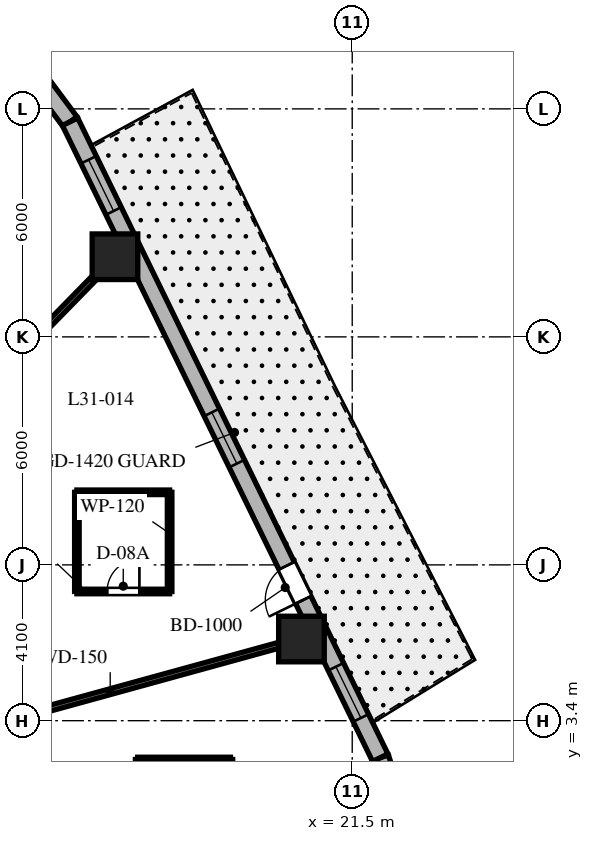
"""IFC4 building model, lengths in metres.
Left out: names, types, materials, properties, quantities, classifications, styles, units other than length and angle.
Written with IfcOpenShell. Run it as: python <this file> out.ifc"""

import sys

from ifc_helpers import new_model, si_unit, direction, frame, frame_2d, origin, origin_2d, place, context, subcontext, project, spatial, rectangle, extrude, element, fill, save


model = new_model("IFC4")
c1 = context("Model", 3, precision=1e-05, world=origin(), true_north=direction((0.0, 1.0)))
c2 = subcontext(c1, "Body", "Model", "MODEL_VIEW")
j1 = project(units=[si_unit("LENGTHUNIT", "METRE"), si_unit("PLANEANGLEUNIT", "RADIAN")], contexts=[c1])
p1 = place(None, origin())
s1 = spatial("IfcSite", under=j1, at=p1, CompositionType="ELEMENT")
p2 = place(p1, origin())
s2 = spatial("IfcBuilding", under=s1, at=p2, CompositionType="ELEMENT")
p3 = place(p2, frame((0.0, 0.0, 128.4)))
s3 = spatial("IfcBuildingStorey", under=s2, at=p3, CompositionType="ELEMENT", Elevation=128.4)
for number, where, z_axis, x_axis in (
    (1, (20.164, 5.549, 0.0), (0.0, 0.0, 1.0), (1.0, 0.0, 0.0)),
    (2, (15.257, 15.609, 0.0), (0.0, 0.0, 1.0), (1.0, 0.0, 0.0)),
):
    element("IfcColumn", number, at=place(p3, frame(where, z_axis=z_axis, x_axis=x_axis)), inside=s3, PredefinedType="COLUMN", context=c2, shape_type="SweptSolid", body=[
        extrude(rectangle(XDim=1.2, YDim=1.2, at=origin_2d()), origin(), (0.0, 0.0, 1.0), 3.7),
    ])
p4 = place(p3, frame((22.522, 1.577, 0.0), z_axis=(0.0, 0.0, 1.0), x_axis=(-0.317372694837, 0.948300887151, 0.0)))
e3 = element("IfcWall", 3, at=p4, inside=s3, PredefinedType="SOLIDWALL", context=c2, shape_type="SweptSolid", body=[
    extrude(rectangle(XDim=0.896, YDim=0.45, at=frame_2d((0.448, 0.0))), origin(), (0.0, 0.0, 1.0), 3.4),
])
p5 = place(p3, frame((14.076, 19.161, 0.0), z_axis=(0.0, 0.0, 1.0), x_axis=(-0.597226657159, 0.802072515412, 0.0)))
e4 = element("IfcWall", 4, at=p5, inside=s3, PredefinedType="SOLIDWALL", context=c2, shape_type="SweptSolid", body=[
    extrude(rectangle(XDim=1.269, YDim=0.45, at=frame_2d((0.635, 0.0))), origin(), (0.0, 0.0, 1.0), 3.4),
])
p6 = place(p3, frame((22.238, 2.427, 0.0), z_axis=(0.0, 0.0, 1.0), x_axis=(-0.438374803278, 0.898792262901, 0.0)))
e5 = element("IfcWall", 5, at=p6, inside=s3, PredefinedType="SOLIDWALL", context=c2, shape_type="SweptSolid", body=[
    extrude(rectangle(XDim=18.618, YDim=0.45, at=frame_2d((9.309, 0.0))), origin(), (0.0, 0.0, 1.0), 3.4),
])
p7 = place(p6, frame((4.62, 0.0, 0.0)))
e6 = element("IfcOpeningElement", 6, at=p7, cuts=e5, PredefinedType="OPENING", context=c2, shape_type="SweptSolid", body=[
    extrude(rectangle(XDim=1.0, YDim=2.15, at=frame_2d((0.5, 1.075))), frame((0.0, 0.235, 0.0), z_axis=(0.0, -1.0, 0.0), x_axis=(1.0, 0.0, 0.0)), (0.0, 0.0, 1.0), 0.47),
])
p8 = place(p6, frame((8.61, 0.0, 0.8)))
e7 = element("IfcOpeningElement", 7, at=p8, cuts=e5, PredefinedType="OPENING", context=c2, shape_type="SweptSolid", body=[
    extrude(rectangle(XDim=1.5, YDim=1.8, at=frame_2d((0.75, 0.9))), frame((0.0, 0.235, 0.0), z_axis=(0.0, -1.0, 0.0), x_axis=(1.0, 0.0, 0.0)), (0.0, 0.0, 1.0), 0.47),
])
p9 = place(p6, frame((16.006, 0.0, 0.8)))
e8 = element("IfcOpeningElement", 8, at=p9, cuts=e5, PredefinedType="OPENING", context=c2, shape_type="SweptSolid", body=[
    extrude(rectangle(XDim=1.5, YDim=1.8, at=frame_2d((0.75, 0.9))), frame((0.0, 0.235, 0.0), z_axis=(0.0, -1.0, 0.0), x_axis=(1.0, 0.0, 0.0)), (0.0, 0.0, 1.0), 0.47),
])
p10 = place(p6, frame((1.163, 0.0, 0.8)))
e9 = element("IfcOpeningElement", 9, at=p10, cuts=e5, PredefinedType="OPENING", context=c2, shape_type="SweptSolid", body=[
    extrude(rectangle(XDim=1.5, YDim=1.8, at=frame_2d((0.75, 0.9))), frame((0.0, 0.235, 0.0), z_axis=(0.0, -1.0, 0.0), x_axis=(1.0, 0.0, 0.0)), (0.0, 0.0, 1.0), 0.47),
])
p11 = place(p3, frame((11.35, 3.123, 0.0), z_axis=(0.0, 0.0, 1.0), x_axis=(0.964151983214, 0.265350623261, 0.0)))
e10 = element("IfcWall", 10, at=p11, inside=s3, PredefinedType="PARTITIONING", context=c2, shape_type="SweptSolid", body=[
    extrude(rectangle(XDim=9.645, YDim=0.15, at=frame_2d((4.823, 0.0))), origin(), (0.0, 0.0, 1.0), 2.54),
])
p12 = place(p3, frame((9.628, 9.85, 0.0), z_axis=(0.0, 0.0, 1.0), x_axis=(0.698992824326, 0.715128681805, 0.0)))
e11 = element("IfcWall", 11, at=p12, inside=s3, PredefinedType="PARTITIONING", context=c2, shape_type="SweptSolid", body=[
    extrude(rectangle(XDim=8.579, YDim=0.15, at=frame_2d((4.29, 0.0))), origin(), (0.0, 0.0, 1.0), 2.54),
])
p13 = place(p3, frame((14.255, 6.8, 0.0), z_axis=(0.0, 0.0, 1.0), x_axis=(1.0, 0.0, 0.0)))
e12 = element("IfcWall", 12, at=p13, inside=s3, PredefinedType="PARTITIONING", context=c2, shape_type="SweptSolid", body=[
    extrude(rectangle(XDim=2.44, YDim=0.12, at=frame_2d((1.22, 0.0))), origin(), (0.0, 0.0, 1.0), 2.927),
])
p14 = place(p13, frame((0.795, 0.0, 0.0)))
e13 = element("IfcOpeningElement", 13, at=p14, cuts=e12, PredefinedType="OPENING", context=c2, shape_type="SweptSolid", body=[
    extrude(rectangle(XDim=0.85, YDim=2.03, at=frame_2d((0.425, 1.015))), frame((0.0, 0.07, 0.0), z_axis=(0.0, -1.0, 0.0), x_axis=(1.0, 0.0, 0.0)), (0.0, 0.0, 1.0), 0.14),
])
p15 = place(p3, frame((16.695, 6.8, 0.0), z_axis=(0.0, 0.0, 1.0), x_axis=(0.0, 1.0, 0.0)))
e14 = element("IfcWall", 14, at=p15, inside=s3, PredefinedType="PARTITIONING", context=c2, shape_type="SweptSolid", body=[
    extrude(rectangle(XDim=2.61, YDim=0.12, at=frame_2d((1.305, 0.0))), origin(), (0.0, 0.0, 1.0), 3.4),
])
p16 = place(p3, frame((16.695, 9.41, 0.0), z_axis=(0.0, 0.0, 1.0), x_axis=(-1.0, 0.0, 0.0)))
e15 = element("IfcWall", 15, at=p16, inside=s3, PredefinedType="PARTITIONING", context=c2, shape_type="SweptSolid", body=[
    extrude(rectangle(XDim=2.44, YDim=0.12, at=frame_2d((1.22, 0.0))), origin(), (0.0, 0.0, 1.0), 2.927),
])
for number, where, z_axis, x_axis in (
    (16, (14.255, 9.41, 0.0), (0.0, 0.0, 1.0), (0.0, -1.0, 0.0)),
    (17, (18.295, -0.231, 0.0), (0.0, 0.0, 1.0), (0.0, 1.0, 0.0)),
):
    element("IfcWall", number, at=place(p3, frame(where, z_axis=z_axis, x_axis=x_axis)), inside=s3, PredefinedType="PARTITIONING", context=c2, shape_type="SweptSolid", body=[
        extrude(rectangle(XDim=2.61, YDim=0.12, at=frame_2d((1.305, 0.0))), origin(), (0.0, 0.0, 1.0), 3.4),
    ])
p17 = place(p3, frame((18.295, 2.379, 0.0), z_axis=(0.0, 0.0, 1.0), x_axis=(-1.0, 0.0, 0.0)))
e18 = element("IfcWall", 18, at=p17, inside=s3, PredefinedType="PARTITIONING", context=c2, shape_type="SweptSolid", body=[
    extrude(rectangle(XDim=2.44, YDim=0.12, at=frame_2d((1.22, 0.0))), origin(), (0.0, 0.0, 1.0), 2.841),
])
p18 = place(p3, frame((15.855, 2.379, 0.0), z_axis=(0.0, 0.0, 1.0), x_axis=(0.0, -1.0, 0.0)))
e19 = element("IfcWall", 19, at=p18, inside=s3, PredefinedType="PARTITIONING", context=c2, shape_type="SweptSolid", body=[
    extrude(rectangle(XDim=2.61, YDim=0.12, at=frame_2d((1.305, 0.0))), origin(), (0.0, 0.0, 1.0), 3.4),
])
p19 = place(p7, origin())
e20 = element("IfcDoor", 20, at=p19, inside=s3, OperationType="SINGLE_SWING_LEFT", PredefinedType="DOOR", context=c2, shape_type="SweptSolid", body=[
    extrude(rectangle(XDim=1.0, YDim=2.15, at=frame_2d((0.5, 1.075))), frame((0.0, 0.025, 0.0), z_axis=(0.0, -1.0, 0.0), x_axis=(1.0, 0.0, 0.0)), (0.0, 0.0, 1.0), 0.05),
])
fill(e6, e20)
p20 = place(p8, origin())
e21 = element("IfcWindow", 21, at=p20, inside=s3, PartitioningType="SINGLE_PANEL", PredefinedType="WINDOW", context=c2, shape_type="SweptSolid", body=[
    extrude(rectangle(XDim=1.5, YDim=1.8, at=frame_2d((0.75, 0.9))), frame((0.0, 0.03, 0.0), z_axis=(0.0, -1.0, 0.0), x_axis=(1.0, 0.0, 0.0)), (0.0, 0.0, 1.0), 0.06),
])
fill(e7, e21)
p21 = place(p9, origin())
e22 = element("IfcWindow", 22, at=p21, inside=s3, PartitioningType="SINGLE_PANEL", PredefinedType="WINDOW", context=c2, shape_type="SweptSolid", body=[
    extrude(rectangle(XDim=1.5, YDim=1.8, at=frame_2d((0.75, 0.9))), frame((0.0, 0.03, 0.0), z_axis=(0.0, -1.0, 0.0), x_axis=(1.0, 0.0, 0.0)), (0.0, 0.0, 1.0), 0.06),
])
fill(e8, e22)
p22 = place(p10, origin())
e23 = element("IfcWindow", 23, at=p22, inside=s3, PartitioningType="SINGLE_PANEL", PredefinedType="WINDOW", context=c2, shape_type="SweptSolid", body=[
    extrude(rectangle(XDim=1.5, YDim=1.8, at=frame_2d((0.75, 0.9))), frame((0.0, 0.03, 0.0), z_axis=(0.0, -1.0, 0.0), x_axis=(1.0, 0.0, 0.0)), (0.0, 0.0, 1.0), 0.06),
])
fill(e9, e23)
p23 = place(p14, origin())
e24 = element("IfcDoor", 24, at=p23, inside=s3, OperationType="SINGLE_SWING_RIGHT", PredefinedType="DOOR", context=c2, shape_type="SweptSolid", body=[
    extrude(rectangle(XDim=0.85, YDim=2.03, at=frame_2d((0.425, 1.015))), frame((0.0, 0.025, 0.0), z_axis=(0.0, -1.0, 0.0), x_axis=(1.0, 0.0, 0.0)), (0.0, 0.0, 1.0), 0.05),
])
fill(e13, e24)
save(model, sys.argv[1])
